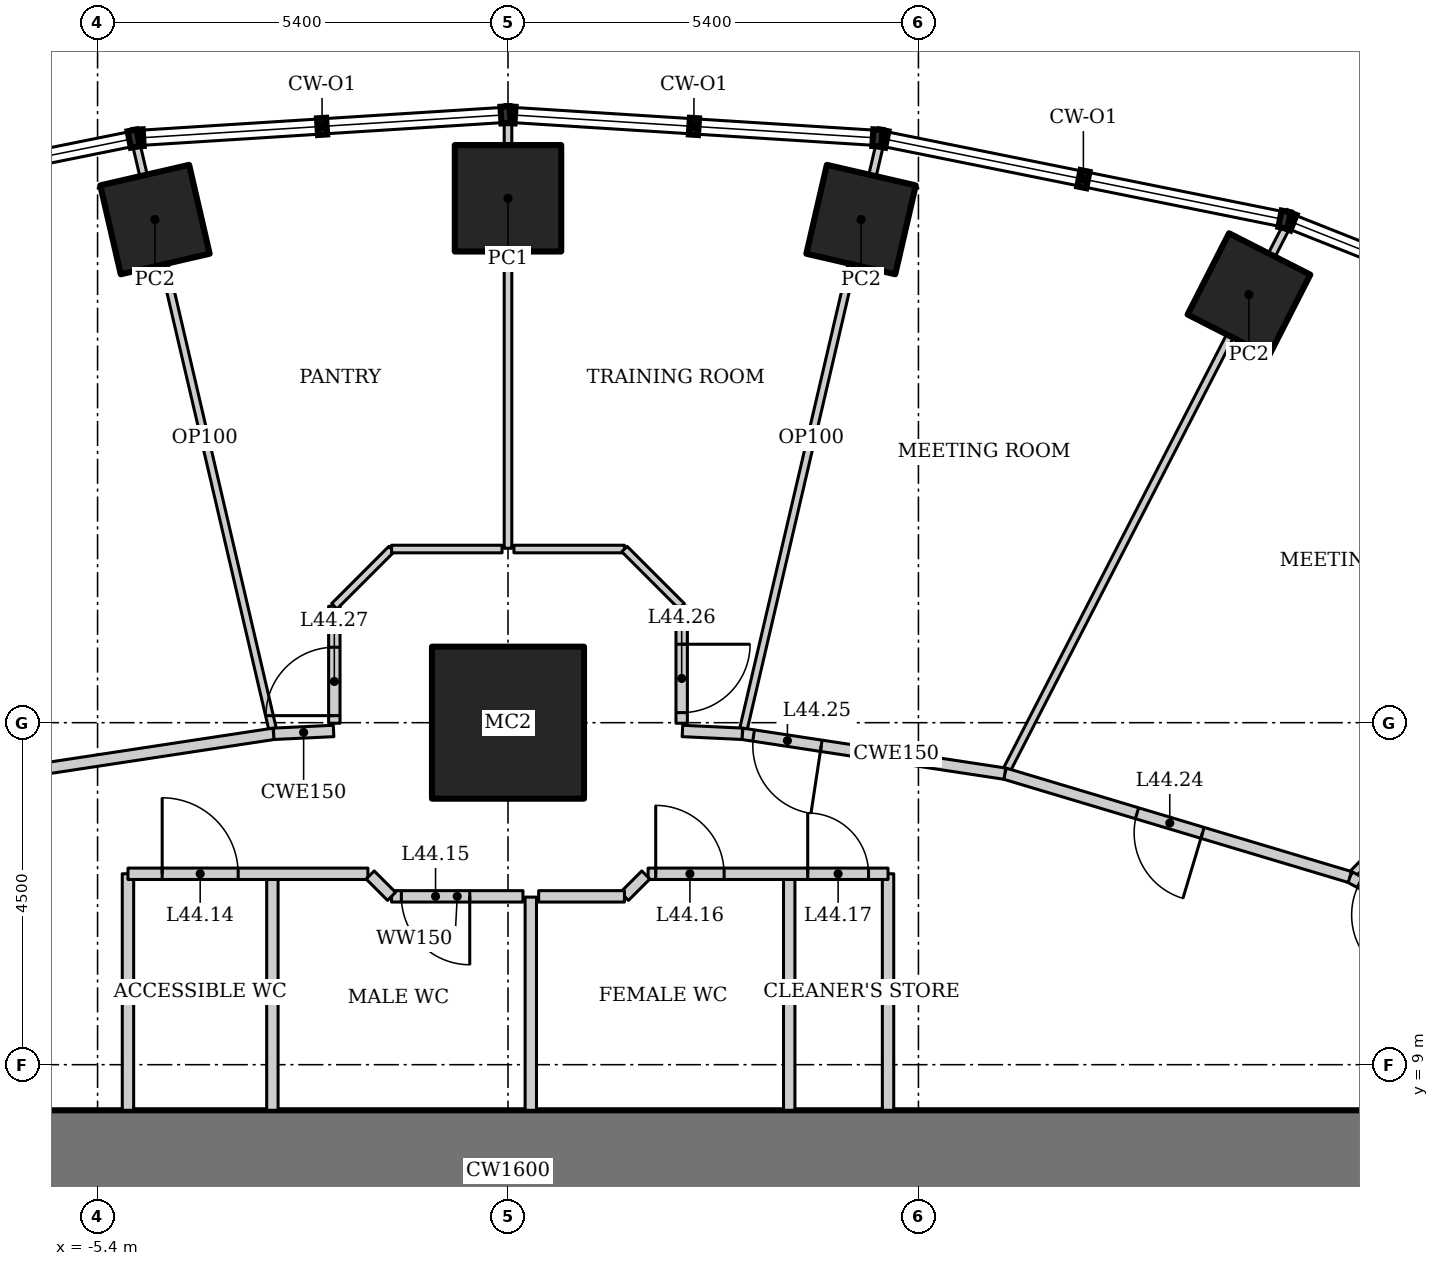
"""IFC4 building model, lengths in metres.
Left out: names, types, materials, properties, quantities, classifications, styles, units other than length and angle.
Written with IfcOpenShell. Run it as: python <this file> out.ifc"""

import sys

from ifc_helpers import new_model, si_unit, direction, frame, frame_2d, origin, origin_2d, place, context, subcontext, project, spatial, rectangle, hollow_rectangle, extrude, element, fill, save


model = new_model("IFC4")
c1 = context("Model", 3, precision=1e-05, world=origin(), true_north=direction((0.0, 1.0)))
c2 = subcontext(c1, "Body", "Model", "MODEL_VIEW")
j1 = project(units=[si_unit("LENGTHUNIT", "METRE"), si_unit("PLANEANGLEUNIT", "RADIAN")], contexts=[c1])
p1 = place(None, origin())
s1 = spatial("IfcSite", under=j1, at=p1, CompositionType="ELEMENT")
p2 = place(p1, origin())
s2 = spatial("IfcBuilding", under=s1, at=p2, CompositionType="ELEMENT")
p3 = place(p2, frame((0.0, 0.0, 188.8)))
s3 = spatial("IfcBuildingStorey", under=s2, at=p3, CompositionType="ELEMENT", Elevation=188.8)
p4 = place(p3, frame((0.0, 13.5, 0.0), z_axis=(0.0, 0.0, 1.0), x_axis=(1.0, 0.0, 0.0)))
e1 = element("IfcColumn", 1, at=p4, inside=s3, PredefinedType="COLUMN", context=c2, shape_type="SweptSolid", body=[
    extrude(hollow_rectangle(XDim=2.0, YDim=2.0, WallThickness=0.17, at=origin_2d()), origin(), (0.0, 0.0, 1.0), 4.2),
])
for number, where, z_axis, x_axis in (
    (2, (9.749, 19.133, 0.0), (0.0, 0.0, 1.0), (0.454, 0.891, 0.0)),
    (3, (4.645, 20.12, 0.0), (0.0, 0.0, 1.0), (0.225, 0.974, 0.0)),
):
    element("IfcColumn", number, at=place(p3, frame(where, z_axis=z_axis, x_axis=x_axis)), inside=s3, PredefinedType="COLUMN", context=c2, shape_type="SweptSolid", body=[
        extrude(hollow_rectangle(XDim=1.2, YDim=1.2, WallThickness=0.1, at=origin_2d()), origin(), (0.0, 0.0, 1.0), 2.88),
    ])
p5 = place(p3, frame((0.0, 20.4, 0.0), z_axis=(0.0, 0.0, 1.0), x_axis=(1.0, 0.0, 0.0)))
e4 = element("IfcColumn", 4, at=p5, inside=s3, PredefinedType="COLUMN", context=c2, shape_type="SweptSolid", body=[
    extrude(hollow_rectangle(XDim=1.4, YDim=1.4, WallThickness=0.1, at=origin_2d()), origin(), (0.0, 0.0, 1.0), 2.66),
])
p6 = place(p3, frame((-4.645, 20.12, 0.0), z_axis=(0.0, 0.0, 1.0), x_axis=(0.974370064785, 0.224951054344, 0.0)))
e5 = element("IfcColumn", 5, at=p6, inside=s3, PredefinedType="COLUMN", context=c2, shape_type="SweptSolid", body=[
    extrude(hollow_rectangle(XDim=1.2, YDim=1.2, WallThickness=0.1, at=origin_2d()), origin(), (0.0, 0.0, 1.0), 2.88),
])
p7 = place(p3, frame((12.2, 7.6, 0.0), z_axis=(0.0, 0.0, 1.0), x_axis=(-1.0, 0.0, 0.0)))
e6 = element("IfcWall", 6, at=p7, inside=s3, PredefinedType="SHEAR", context=c2, shape_type="SweptSolid", body=[
    extrude(rectangle(XDim=24.4, YDim=1.6, at=frame_2d((12.2, 0.0))), origin(), (0.0, 0.0, 1.0), 4.2),
])
p8 = place(p3, frame((16.882, 17.414, 0.0), z_axis=(0.0, 0.0, 1.0), x_axis=(-0.698758056249, -0.715358077348, 0.0)))
e7 = element("IfcWall", 7, at=p8, inside=s3, PredefinedType="PARTITIONING", context=c2, shape_type="SweptSolid", body=[
    extrude(rectangle(XDim=8.31, YDim=0.1, at=frame_2d((4.155, 0.0))), origin(), (0.0, 0.0, 1.0), 3.058),
])
p9 = place(p3, frame((10.253, 20.052, 0.0), z_axis=(0.0, 0.0, 1.0), x_axis=(-0.457535449567, -0.889191381194, 0.0)))
e8 = element("IfcWall", 8, at=p9, inside=s3, PredefinedType="PARTITIONING", context=c2, shape_type="SweptSolid", body=[
    extrude(rectangle(XDim=8.123, YDim=0.1, at=frame_2d((4.061, 0.0))), origin(), (0.0, 0.0, 1.0), 3.228),
])
for number, where, z_axis, x_axis in (
    (9, (4.897, 21.135, 0.0), (0.0, 0.0, 1.0), (-0.227, -0.974, 0.0)),
    (10, (-4.897, 21.135, 0.0), (0.0, 0.0, 1.0), (0.227, -0.974, 0.0)),
):
    element("IfcWall", number, at=place(p3, frame(where, z_axis=z_axis, x_axis=x_axis)), inside=s3, PredefinedType="PARTITIONING", context=c2, shape_type="SweptSolid", body=[
        extrude(rectangle(XDim=7.99, YDim=0.1, at=frame_2d((3.995, 0.0))), origin(), (0.0, 0.0, 1.0), 3.228),
    ])
p10 = place(p3, frame((15.696, 8.969, 0.0), z_axis=(0.0, 0.0, 1.0), x_axis=(-0.879436285334, 0.476016617397, 0.0)))
e11 = element("IfcWall", 11, at=p10, inside=s3, PredefinedType="PARTITIONING", context=c2, shape_type="SweptSolid", body=[
    extrude(rectangle(XDim=5.253, YDim=0.15, at=frame_2d((2.626, 0.0))), origin(), (0.0, 0.0, 1.0), 4.0),
])
p11 = place(p10, frame((4.203, 0.0, 0.0)))
e12 = element("IfcOpeningElement", 12, at=p11, cuts=e11, PredefinedType="OPENING", context=c2, shape_type="SweptSolid", body=[
    extrude(rectangle(XDim=0.9, YDim=2.1, at=frame_2d((0.45, 1.05))), frame((0.0, 0.085, 0.0), z_axis=(0.0, -1.0, 0.0), x_axis=(1.0, 0.0, 0.0)), (0.0, 0.0, 1.0), 0.17),
])
p12 = place(p3, frame((11.076, 11.469, 0.0), z_axis=(0.0, 0.0, 1.0), x_axis=(-0.957933992798, 0.286988615527, 0.0)))
e13 = element("IfcWall", 13, at=p12, inside=s3, PredefinedType="PARTITIONING", context=c2, shape_type="SweptSolid", body=[
    extrude(rectangle(XDim=4.738, YDim=0.15, at=frame_2d((2.369, 0.0))), origin(), (0.0, 0.0, 1.0), 4.0),
])
p13 = place(p12, frame((2.023, 0.0, 0.0)))
e14 = element("IfcOpeningElement", 14, at=p13, cuts=e13, PredefinedType="OPENING", context=c2, shape_type="SweptSolid", body=[
    extrude(rectangle(XDim=0.9, YDim=2.1, at=frame_2d((0.45, 1.05))), frame((0.0, 0.085, 0.0), z_axis=(0.0, -1.0, 0.0), x_axis=(1.0, 0.0, 0.0)), (0.0, 0.0, 1.0), 0.17),
])
p14 = place(p3, frame((6.537, 12.829, 0.0), z_axis=(0.0, 0.0, 1.0), x_axis=(-0.988668719464, 0.150113833987, 0.0)))
e15 = element("IfcWall", 15, at=p14, inside=s3, PredefinedType="PARTITIONING", context=c2, shape_type="SweptSolid", body=[
    extrude(rectangle(XDim=3.493, YDim=0.15, at=frame_2d((1.747, 0.0))), origin(), (0.0, 0.0, 1.0), 4.0),
])
p15 = place(p14, frame((2.444, 0.0, 0.0)))
e16 = element("IfcOpeningElement", 16, at=p15, cuts=e15, PredefinedType="OPENING", context=c2, shape_type="SweptSolid", body=[
    extrude(rectangle(XDim=0.9, YDim=2.1, at=frame_2d((0.45, 1.05))), frame((0.0, 0.085, 0.0), z_axis=(0.0, -1.0, 0.0), x_axis=(1.0, 0.0, 0.0)), (0.0, 0.0, 1.0), 0.17),
])
p16 = place(p3, frame((-3.083, 13.354, 0.0), z_axis=(0.0, 0.0, 1.0), x_axis=(-0.988668719464, -0.150113833987, 0.0)))
e17 = element("IfcWall", 17, at=p16, inside=s3, PredefinedType="PARTITIONING", context=c2, shape_type="SweptSolid", body=[
    extrude(rectangle(XDim=3.493, YDim=0.15, at=frame_2d((1.747, 0.0))), origin(), (0.0, 0.0, 1.0), 4.0),
])
for number, where, z_axis, x_axis in (
    (18, (-5.0, 8.4, 0.0), (0.0, 0.0, 1.0), (0.0, 1.0, 0.0)),
    (19, (5.0, 8.4, 0.0), (0.0, 0.0, 1.0), (0.0, 1.0, 0.0)),
    (20, (-3.1, 8.4, 0.0), (0.0, 0.0, 1.0), (0.0, 1.0, 0.0)),
    (21, (3.7, 8.4, 0.0), (0.0, 0.0, 1.0), (0.0, 1.0, 0.0)),
):
    element("IfcWall", number, at=place(p3, frame(where, z_axis=z_axis, x_axis=x_axis)), inside=s3, PredefinedType="SOLIDWALL", context=c2, shape_type="SweptSolid", body=[
        extrude(rectangle(XDim=3.112, YDim=0.15, at=frame_2d((1.556, 0.0))), origin(), (0.0, 0.0, 1.0), 4.0),
    ])
p17 = place(p3, frame((0.0, 21.445, 0.0), z_axis=(0.0, 0.0, 1.0), x_axis=(0.0, -1.0, 0.0)))
e22 = element("IfcWall", 22, at=p17, inside=s3, PredefinedType="PARTITIONING", context=c2, shape_type="SweptSolid", body=[
    extrude(rectangle(XDim=5.65, YDim=0.1, at=frame_2d((2.825, 0.0))), origin(), (0.0, 0.0, 1.0), 2.8),
])
for number, where, z_axis, x_axis in (
    (23, (3.083, 13.354, 0.0), (0.0, 0.0, 1.0), (-0.999, 0.047, 0.0)),
    (24, (-2.295, 13.391, 0.0), (0.0, 0.0, 1.0), (-0.999, -0.047, 0.0)),
):
    element("IfcWall", number, at=place(p3, frame(where, z_axis=z_axis, x_axis=x_axis)), inside=s3, PredefinedType="PARTITIONING", context=c2, shape_type="SweptSolid", body=[
        extrude(rectangle(XDim=0.789, YDim=0.15, at=frame_2d((0.395, 0.0))), origin(), (0.0, 0.0, 1.0), 4.0),
    ])
p18 = place(p3, frame((-5.0, 11.512, 0.0), z_axis=(0.0, 0.0, 1.0), x_axis=(1.0, 0.0, 0.0)))
e25 = element("IfcWall", 25, at=p18, inside=s3, PredefinedType="SOLIDWALL", context=c2, shape_type="SweptSolid", body=[
    extrude(rectangle(XDim=3.156, YDim=0.15, at=frame_2d((1.578, 0.0))), origin(), (0.0, 0.0, 1.0), 4.0),
])
p19 = place(p18, frame((0.45, 0.0, 0.0)))
e26 = element("IfcOpeningElement", 26, at=p19, cuts=e25, PredefinedType="OPENING", context=c2, shape_type="SweptSolid", body=[
    extrude(rectangle(XDim=1.0, YDim=2.1, at=frame_2d((0.5, 1.05))), frame((0.0, 0.085, 0.0), z_axis=(0.0, -1.0, 0.0), x_axis=(1.0, 0.0, 0.0)), (0.0, 0.0, 1.0), 0.17),
])
p20 = place(p3, frame((1.844, 11.512, 0.0), z_axis=(0.0, 0.0, 1.0), x_axis=(1.0, 0.0, 0.0)))
e27 = element("IfcWall", 27, at=p20, inside=s3, PredefinedType="SOLIDWALL", context=c2, shape_type="SweptSolid", body=[
    extrude(rectangle(XDim=3.156, YDim=0.15, at=frame_2d((1.578, 0.0))), origin(), (0.0, 0.0, 1.0), 4.0),
])
p21 = place(p20, frame((0.1, 0.0, 0.0)))
e28 = element("IfcOpeningElement", 28, at=p21, cuts=e27, PredefinedType="OPENING", context=c2, shape_type="SweptSolid", body=[
    extrude(rectangle(XDim=0.9, YDim=2.1, at=frame_2d((0.45, 1.05))), frame((0.0, 0.085, 0.0), z_axis=(0.0, -1.0, 0.0), x_axis=(1.0, 0.0, 0.0)), (0.0, 0.0, 1.0), 0.17),
])
p22 = place(p20, frame((2.1, 0.0, 0.0)))
e29 = element("IfcOpeningElement", 29, at=p22, cuts=e27, PredefinedType="OPENING", context=c2, shape_type="SweptSolid", body=[
    extrude(rectangle(XDim=0.8, YDim=2.1, at=frame_2d((0.4, 1.05))), frame((0.0, 0.085, 0.0), z_axis=(0.0, -1.0, 0.0), x_axis=(1.0, 0.0, 0.0)), (0.0, 0.0, 1.0), 0.17),
])
p23 = place(p3, frame((0.3, 8.4, 0.0), z_axis=(0.0, 0.0, 1.0), x_axis=(0.0, 1.0, 0.0)))
e30 = element("IfcWall", 30, at=p23, inside=s3, PredefinedType="SOLIDWALL", context=c2, shape_type="SweptSolid", body=[
    extrude(rectangle(XDim=2.805, YDim=0.15, at=frame_2d((1.403, 0.0))), origin(), (0.0, 0.0, 1.0), 2.8),
])
p24 = place(p3, frame((0.197, 11.215, 0.0), z_axis=(0.0, 0.0, 1.0), x_axis=(-1.0, 0.0, 0.0)))
e31 = element("IfcWall", 31, at=p24, inside=s3, PredefinedType="SOLIDWALL", context=c2, shape_type="SweptSolid", body=[
    extrude(rectangle(XDim=1.729, YDim=0.15, at=frame_2d((0.865, 0.0))), origin(), (0.0, 0.0, 1.0), 4.0),
])
p25 = place(p24, frame((0.7, 0.0, 0.0)))
e32 = element("IfcOpeningElement", 32, at=p25, cuts=e31, PredefinedType="OPENING", context=c2, shape_type="SweptSolid", body=[
    extrude(rectangle(XDim=0.9, YDim=2.1, at=frame_2d((0.45, 1.05))), frame((0.0, 0.085, 0.0), z_axis=(0.0, -1.0, 0.0), x_axis=(1.0, 0.0, 0.0)), (0.0, 0.0, 1.0), 0.17),
])
for number, where, z_axis, x_axis in (
    (33, (-1.532, 11.215, 0.0), (0.0, 0.0, 1.0), (-0.707, 0.707, 0.0)),
    (34, (1.813, 11.496, 0.0), (0.0, 0.0, 1.0), (-0.707, -0.707, 0.0)),
):
    element("IfcWall", number, at=place(p3, frame(where, z_axis=z_axis, x_axis=x_axis)), inside=s3, PredefinedType="SOLIDWALL", context=c2, shape_type="SweptSolid", body=[
        extrude(rectangle(XDim=0.397, YDim=0.15, at=frame_2d((0.199, 0.0))), origin(), (0.0, 0.0, 1.0), 4.0),
    ])
p26 = place(p3, frame((1.532, 11.215, 0.0), z_axis=(0.0, 0.0, 1.0), x_axis=(-1.0, 0.0, 0.0)))
e35 = element("IfcWall", 35, at=p26, inside=s3, PredefinedType="SOLIDWALL", context=c2, shape_type="SweptSolid", body=[
    extrude(rectangle(XDim=1.129, YDim=0.15, at=frame_2d((0.564, 0.0))), origin(), (0.0, 0.0, 1.0), 4.0),
])
p27 = place(p3, frame((0.078, 15.785, 0.0), z_axis=(0.0, 0.0, 1.0), x_axis=(1.0, 0.0, 0.0)))
e36 = element("IfcWall", 36, at=p27, inside=s3, PredefinedType="PARTITIONING", context=c2, shape_type="SweptSolid", body=[
    extrude(rectangle(XDim=1.454, YDim=0.1, at=frame_2d((0.727, 0.0))), origin(), (0.0, 0.0, 1.0), 4.0),
])
p28 = place(p3, frame((1.532, 15.785, 0.0), z_axis=(0.0, 0.0, 1.0), x_axis=(0.707106781187, -0.707106781187, 0.0)))
e37 = element("IfcWall", 37, at=p28, inside=s3, PredefinedType="PARTITIONING", context=c2, shape_type="SweptSolid", body=[
    extrude(rectangle(XDim=1.064, YDim=0.1, at=frame_2d((0.532, 0.0))), origin(), (0.0, 0.0, 1.0), 4.0),
])
p29 = place(p3, frame((2.285, 15.032, 0.0), z_axis=(0.0, 0.0, 1.0), x_axis=(0.0, -1.0, 0.0)))
e38 = element("IfcWall", 38, at=p29, inside=s3, PredefinedType="PARTITIONING", context=c2, shape_type="SweptSolid", body=[
    extrude(rectangle(XDim=1.54, YDim=0.15, at=frame_2d((0.77, 0.0))), origin(), (0.0, 0.0, 1.0), 4.0),
])
p30 = place(p29, frame((0.5, 0.0, 0.0)))
e39 = element("IfcOpeningElement", 39, at=p30, cuts=e38, PredefinedType="OPENING", context=c2, shape_type="SweptSolid", body=[
    extrude(rectangle(XDim=0.9, YDim=2.1, at=frame_2d((0.45, 1.05))), frame((0.0, 0.085, 0.0), z_axis=(0.0, -1.0, 0.0), x_axis=(1.0, 0.0, 0.0)), (0.0, 0.0, 1.0), 0.17),
])
p31 = place(p3, frame((-2.285, 13.493, 0.0), z_axis=(0.0, 0.0, 1.0), x_axis=(0.0, 1.0, 0.0)))
e40 = element("IfcWall", 40, at=p31, inside=s3, PredefinedType="PARTITIONING", context=c2, shape_type="SweptSolid", body=[
    extrude(rectangle(XDim=1.54, YDim=0.15, at=frame_2d((0.77, 0.0))), origin(), (0.0, 0.0, 1.0), 4.0),
])
p32 = place(p31, frame((0.1, 0.0, 0.0)))
e41 = element("IfcOpeningElement", 41, at=p32, cuts=e40, PredefinedType="OPENING", context=c2, shape_type="SweptSolid", body=[
    extrude(rectangle(XDim=0.9, YDim=2.1, at=frame_2d((0.45, 1.05))), frame((0.0, 0.085, 0.0), z_axis=(0.0, -1.0, 0.0), x_axis=(1.0, 0.0, 0.0)), (0.0, 0.0, 1.0), 0.17),
])
p33 = place(p3, frame((-2.285, 15.032, 0.0), z_axis=(0.0, 0.0, 1.0), x_axis=(0.707106781187, 0.707106781187, 0.0)))
e42 = element("IfcWall", 42, at=p33, inside=s3, PredefinedType="PARTITIONING", context=c2, shape_type="SweptSolid", body=[
    extrude(rectangle(XDim=1.064, YDim=0.1, at=frame_2d((0.532, 0.0))), origin(), (0.0, 0.0, 1.0), 4.0),
])
p34 = place(p3, frame((-1.532, 15.785, 0.0), z_axis=(0.0, 0.0, 1.0), x_axis=(1.0, 0.0, 0.0)))
e43 = element("IfcWall", 43, at=p34, inside=s3, PredefinedType="PARTITIONING", context=c2, shape_type="SweptSolid", body=[
    extrude(rectangle(XDim=1.454, YDim=0.1, at=frame_2d((0.727, 0.0))), origin(), (0.0, 0.0, 1.0), 4.0),
])
p35 = place(p19, origin())
e44 = element("IfcDoor", 44, at=p35, inside=s3, OperationType="SINGLE_SWING_LEFT", PredefinedType="DOOR", context=c2, shape_type="SweptSolid", body=[
    extrude(rectangle(XDim=1.0, YDim=2.1, at=frame_2d((0.5, 1.05))), frame((0.0, 0.025, 0.0), z_axis=(0.0, -1.0, 0.0), x_axis=(1.0, 0.0, 0.0)), (0.0, 0.0, 1.0), 0.05),
])
fill(e26, e44)
p36 = place(p25, origin())
e45 = element("IfcDoor", 45, at=p36, inside=s3, OperationType="SINGLE_SWING_LEFT", PredefinedType="DOOR", context=c2, shape_type="SweptSolid", body=[
    extrude(rectangle(XDim=0.9, YDim=2.1, at=frame_2d((0.45, 1.05))), frame((0.0, 0.025, 0.0), z_axis=(0.0, -1.0, 0.0), x_axis=(1.0, 0.0, 0.0)), (0.0, 0.0, 1.0), 0.05),
])
fill(e32, e45)
p37 = place(p21, origin())
e46 = element("IfcDoor", 46, at=p37, inside=s3, OperationType="SINGLE_SWING_LEFT", PredefinedType="DOOR", context=c2, shape_type="SweptSolid", body=[
    extrude(rectangle(XDim=0.9, YDim=2.1, at=frame_2d((0.45, 1.05))), frame((0.0, 0.025, 0.0), z_axis=(0.0, -1.0, 0.0), x_axis=(1.0, 0.0, 0.0)), (0.0, 0.0, 1.0), 0.05),
])
fill(e28, e46)
p38 = place(p22, origin())
e47 = element("IfcDoor", 47, at=p38, inside=s3, OperationType="SINGLE_SWING_LEFT", PredefinedType="DOOR", context=c2, shape_type="SweptSolid", body=[
    extrude(rectangle(XDim=0.8, YDim=2.1, at=frame_2d((0.4, 1.05))), frame((0.0, 0.025, 0.0), z_axis=(0.0, -1.0, 0.0), x_axis=(1.0, 0.0, 0.0)), (0.0, 0.0, 1.0), 0.05),
])
fill(e29, e47)
p39 = place(p11, origin())
e48 = element("IfcDoor", 48, at=p39, inside=s3, OperationType="SINGLE_SWING_LEFT", PredefinedType="DOOR", context=c2, shape_type="SweptSolid", body=[
    extrude(rectangle(XDim=0.9, YDim=2.1, at=frame_2d((0.45, 1.05))), frame((0.0, 0.025, 0.0), z_axis=(0.0, -1.0, 0.0), x_axis=(1.0, 0.0, 0.0)), (0.0, 0.0, 1.0), 0.05),
])
fill(e12, e48)
p40 = place(p13, origin())
e49 = element("IfcDoor", 49, at=p40, inside=s3, OperationType="SINGLE_SWING_LEFT", PredefinedType="DOOR", context=c2, shape_type="SweptSolid", body=[
    extrude(rectangle(XDim=0.9, YDim=2.1, at=frame_2d((0.45, 1.05))), frame((0.0, 0.025, 0.0), z_axis=(0.0, -1.0, 0.0), x_axis=(1.0, 0.0, 0.0)), (0.0, 0.0, 1.0), 0.05),
])
fill(e14, e49)
p41 = place(p15, origin())
e50 = element("IfcDoor", 50, at=p41, inside=s3, OperationType="SINGLE_SWING_LEFT", PredefinedType="DOOR", context=c2, shape_type="SweptSolid", body=[
    extrude(rectangle(XDim=0.9, YDim=2.1, at=frame_2d((0.45, 1.05))), frame((0.0, 0.025, 0.0), z_axis=(0.0, -1.0, 0.0), x_axis=(1.0, 0.0, 0.0)), (0.0, 0.0, 1.0), 0.05),
])
fill(e16, e50)
p42 = place(p30, origin())
e51 = element("IfcDoor", 51, at=p42, inside=s3, OperationType="SINGLE_SWING_LEFT", PredefinedType="DOOR", context=c2, shape_type="SweptSolid", body=[
    extrude(rectangle(XDim=0.9, YDim=2.1, at=frame_2d((0.45, 1.05))), frame((0.0, 0.025, 0.0), z_axis=(0.0, -1.0, 0.0), x_axis=(1.0, 0.0, 0.0)), (0.0, 0.0, 1.0), 0.05),
])
fill(e39, e51)
p43 = place(p32, origin())
e52 = element("IfcDoor", 52, at=p43, inside=s3, OperationType="SINGLE_SWING_LEFT", PredefinedType="DOOR", context=c2, shape_type="SweptSolid", body=[
    extrude(rectangle(XDim=0.9, YDim=2.1, at=frame_2d((0.45, 1.05))), frame((0.0, 0.025, 0.0), z_axis=(0.0, -1.0, 0.0), x_axis=(1.0, 0.0, 0.0)), (0.0, 0.0, 1.0), 0.05),
])
fill(e41, e52)
save(model, sys.argv[1])
